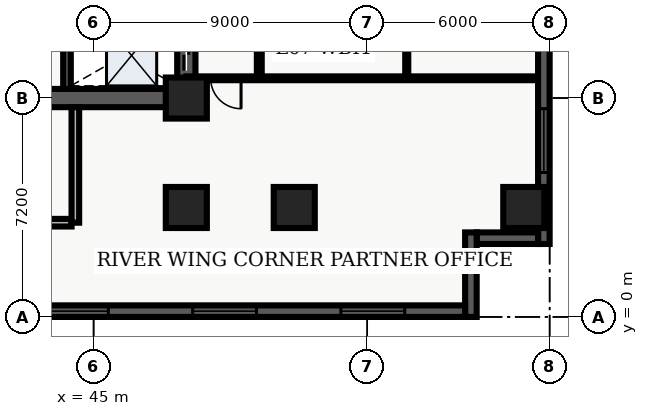
"""IFC4 building model, lengths in metres.
Left out: names, types, materials, properties, quantities, classifications, styles, units other than length and angle.
Written with IfcOpenShell. Run it as: python <this file> out.ifc"""

import sys

from ifc_helpers import new_model, entity, si_unit, converted_unit, direction, frame, origin_with_axes, origin_2d_with_axis, place, context, subcontext, project, spatial, polyline, rectangle, outline, extrude, element, fill, save


model = new_model("IFC4")
c1 = context("Model", 3, precision=1e-05, world=origin_with_axes(), true_north=direction((0.0, 1.0)))
c2 = subcontext(c1, "Body", "Model", "MODEL_VIEW")
j1 = project(units=[si_unit("LENGTHUNIT", "METRE"), converted_unit("PLANEANGLEUNIT", "DEGREE", entity("IfcPlaneAngleMeasure", 0.017), si_unit("PLANEANGLEUNIT", "RADIAN"), dimensions=[0, 0, 0, 0, 0, 0, 0])], contexts=[c1])
p1 = place(None, origin_with_axes())
s1 = spatial("IfcSite", under=j1, at=p1, CompositionType="ELEMENT")
p2 = place(p1, origin_with_axes())
s2 = spatial("IfcBuilding", under=s1, at=p2, CompositionType="ELEMENT")
p3 = place(p2, frame((0.0, 0.0, 32.7), z_axis=(0.0, 0.0, 1.0), x_axis=(1.0, 0.0, 0.0)))
s3 = spatial("IfcBuildingStorey", under=s2, at=p3, CompositionType="ELEMENT", Elevation=32.7)
p4 = place(p3, frame((40.2, 7.2, 0.0), z_axis=(0.0, 0.0, 1.0), x_axis=(1.0, 0.0, 0.0)))
e1 = element("IfcWall", 1, at=p4, inside=s3, PredefinedType="SHEAR", context=c2, shape_type="SweptSolid", body=[
    extrude(outline(polyline([(0.0, -0.3), (7.85, -0.3), (7.85, 0.3), (0.0, 0.3), (0.0, -0.3)])), origin_with_axes(), (0.0, 0.0, 1.0), 3.66),
])
p5 = place(p4, frame((2.175, 0.0, 0.0), z_axis=(0.0, 0.0, 1.0), x_axis=(1.0, 0.0, 0.0)))
e2 = element("IfcOpeningElement", 2, at=p5, cuts=e1, PredefinedType="OPENING", context=c2, shape_type="SweptSolid", body=[
    extrude(rectangle(XDim=1.05, YDim=0.62, at=origin_2d_with_axis()), origin_with_axes(), (0.0, 0.0, 1.0), 2.15),
])
p6 = place(p3, frame((48.05, 7.2, 0.0), z_axis=(0.0, 0.0, 1.0), x_axis=(0.0, 1.0, 0.0)))
e3 = element("IfcWall", 3, at=p6, inside=s3, PredefinedType="SHEAR", context=c2, shape_type="SweptSolid", body=[
    extrude(outline(polyline([(0.0, -0.3), (15.6, -0.3), (15.6, 0.3), (0.0, 0.3), (0.0, -0.3)])), origin_with_axes(), (0.0, 0.0, 1.0), 3.66),
])
p7 = place(p6, frame((1.425, 0.0, 0.0), z_axis=(0.0, 0.0, 1.0), x_axis=(1.0, 0.0, 0.0)))
e4 = element("IfcOpeningElement", 4, at=p7, cuts=e3, PredefinedType="OPENING", context=c2, shape_type="SweptSolid", body=[
    extrude(rectangle(XDim=1.05, YDim=0.62, at=origin_2d_with_axis()), origin_with_axes(), (0.0, 0.0, 1.0), 2.15),
])
p8 = place(p6, frame((3.475, 0.0, 0.0), z_axis=(0.0, 0.0, 1.0), x_axis=(1.0, 0.0, 0.0)))
e5 = element("IfcOpeningElement", 5, at=p8, cuts=e3, PredefinedType="OPENING", context=c2, shape_type="SweptSolid", body=[
    extrude(rectangle(XDim=1.05, YDim=0.62, at=origin_2d_with_axis()), origin_with_axes(), (0.0, 0.0, 1.0), 2.15),
])
p9 = place(p6, frame((5.625, 0.0, 0.0), z_axis=(0.0, 0.0, 1.0), x_axis=(1.0, 0.0, 0.0)))
e6 = element("IfcOpeningElement", 6, at=p9, cuts=e3, PredefinedType="OPENING", context=c2, shape_type="SweptSolid", body=[
    extrude(rectangle(XDim=0.95, YDim=0.62, at=origin_2d_with_axis()), origin_with_axes(), (0.0, 0.0, 1.0), 2.15),
])
p10 = place(p3, frame((44.125, 7.5, 0.0), z_axis=(0.0, 0.0, 1.0), x_axis=(0.0, 1.0, 0.0)))
e7 = element("IfcWall", 7, at=p10, inside=s3, PredefinedType="SHEAR", context=c2, shape_type="SweptSolid", body=[
    extrude(outline(polyline([(0.0, -0.125), (15.0, -0.125), (15.0, 0.125), (0.0, 0.125), (0.0, -0.125)])), origin_with_axes(), (0.0, 0.0, 1.0), 3.66),
])
p11 = place(p3, frame((40.325, 3.1, 0.0), z_axis=(0.0, 0.0, 1.0), x_axis=(1.0, 0.0, 0.0)))
e8 = element("IfcWall", 8, at=p11, inside=s3, PredefinedType="SOLIDWALL", context=c2, shape_type="SweptSolid", body=[
    extrude(outline(polyline([(0.0, -0.125), (3.95, -0.125), (3.95, 0.125), (0.0, 0.125), (0.0, -0.125)])), origin_with_axes(), (0.0, 0.0, 1.0), 2.7),
])
p12 = place(p3, frame((44.4, 3.1, 0.0), z_axis=(0.0, 0.0, 1.0), x_axis=(0.0, 1.0, 0.0)))
e9 = element("IfcWall", 9, at=p12, inside=s3, PredefinedType="SOLIDWALL", context=c2, shape_type="SweptSolid", body=[
    extrude(outline(polyline([(0.0, -0.125), (3.8, -0.125), (3.8, 0.125), (0.0, 0.125), (0.0, -0.125)])), origin_with_axes(), (0.0, 0.0, 1.0), 2.7),
])
for number, where, z_axis, x_axis in (
    (10, (48.05, 3.6, 0.0), (0.0, 0.0, 1.0), (1.0, 0.0, 0.0)),
    (11, (48.05, 7.2, 0.0), (0.0, 0.0, 1.0), (1.0, 0.0, 0.0)),
    (12, (51.6, 3.6, 0.0), (0.0, 0.0, 1.0), (1.0, 0.0, 0.0)),
    (13, (59.15, 3.6, 0.0), (0.0, 0.0, 1.0), (1.0, 0.0, 0.0)),
):
    element("IfcColumn", number, at=place(p3, frame(where, z_axis=z_axis, x_axis=x_axis)), inside=s3, PredefinedType="COLUMN", context=c2, shape_type="SweptSolid", body=[
        extrude(rectangle(XDim=1.35, YDim=1.35, at=origin_2d_with_axis()), origin_with_axes(), (0.0, 0.0, 1.0), 3.9),
    ])
p13 = place(p3, frame((50.45, 7.85, 0.0), z_axis=(0.0, 0.0, 1.0), x_axis=(0.0, 1.0, 0.0)))
e14 = element("IfcWall", 14, at=p13, inside=s3, PredefinedType="PARTITIONING", context=c2, shape_type="SweptSolid", body=[
    extrude(outline(polyline([(0.0, -0.08), (18.8, -0.08), (18.8, 0.08), (0.0, 0.08), (0.0, -0.08)])), origin_with_axes(), (0.0, 0.0, 1.0), 2.7),
])
p14 = place(p13, frame((4.473, 0.0, 0.0), z_axis=(0.0, 0.0, 1.0), x_axis=(1.0, 0.0, 0.0)))
e15 = element("IfcOpeningElement", 15, at=p14, cuts=e14, PredefinedType="OPENING", context=c2, shape_type="SweptSolid", body=[
    extrude(rectangle(XDim=1.0, YDim=0.18, at=origin_2d_with_axis()), origin_with_axes(), (0.0, 0.0, 1.0), 2.15),
])
p15 = place(p13, frame((7.597, 0.0, 0.0), z_axis=(0.0, 0.0, 1.0), x_axis=(1.0, 0.0, 0.0)))
e16 = element("IfcOpeningElement", 16, at=p15, cuts=e14, PredefinedType="OPENING", context=c2, shape_type="SweptSolid", body=[
    extrude(rectangle(XDim=1.0, YDim=0.18, at=origin_2d_with_axis()), origin_with_axes(), (0.0, 0.0, 1.0), 2.15),
])
p16 = place(p13, frame((14.075, 0.0, 0.0), z_axis=(0.0, 0.0, 1.0), x_axis=(1.0, 0.0, 0.0)))
e17 = element("IfcOpeningElement", 17, at=p16, cuts=e14, PredefinedType="OPENING", context=c2, shape_type="SweptSolid", body=[
    extrude(rectangle(XDim=1.0, YDim=0.18, at=origin_2d_with_axis()), origin_with_axes(), (0.0, 0.0, 1.0), 2.15),
])
p17 = place(p3, frame((59.64, 7.85, 0.0), z_axis=(0.0, 0.0, 1.0), x_axis=(-1.0, 0.0, 0.0)))
e18 = element("IfcWall", 18, at=p17, inside=s3, PredefinedType="PARTITIONING", context=c2, shape_type="SweptSolid", body=[
    extrude(outline(polyline([(0.0, -0.062), (11.59, -0.062), (11.59, 0.062), (0.0, 0.062), (0.0, -0.062)])), origin_with_axes(), (0.0, 0.0, 1.0), 2.7),
])
p18 = place(p17, frame((10.29, 0.0, 0.0), z_axis=(0.0, 0.0, 1.0), x_axis=(1.0, 0.0, 0.0)))
e19 = element("IfcOpeningElement", 19, at=p18, cuts=e18, PredefinedType="OPENING", context=c2, shape_type="SweptSolid", body=[
    extrude(rectangle(XDim=1.0, YDim=0.145, at=origin_2d_with_axis()), origin_with_axes(), (0.0, 0.0, 1.0), 2.15),
])
p19 = place(p3, frame((55.3, 7.98, 0.0), z_axis=(0.0, 0.0, 1.0), x_axis=(0.0, 1.0, 0.0)))
e20 = element("IfcWall", 20, at=p19, inside=s3, PredefinedType="PARTITIONING", context=c2, shape_type="SweptSolid", body=[
    extrude(outline(polyline([(0.0, -0.05), (18.54, -0.05), (18.54, 0.05), (0.0, 0.05), (0.0, -0.05)])), origin_with_axes(), (0.0, 0.0, 1.0), 2.7),
])
p20 = place(p19, frame((2.471, 0.0, 0.0), z_axis=(0.0, 0.0, 1.0), x_axis=(1.0, 0.0, 0.0)))
e21 = element("IfcOpeningElement", 21, at=p20, cuts=e20, PredefinedType="OPENING", context=c2, shape_type="SweptSolid", body=[
    extrude(rectangle(XDim=0.95, YDim=0.12, at=origin_2d_with_axis()), origin_with_axes(), (0.0, 0.0, 1.0), 2.15),
])
p21 = place(p19, frame((8.027, 0.0, 0.0), z_axis=(0.0, 0.0, 1.0), x_axis=(1.0, 0.0, 0.0)))
e22 = element("IfcOpeningElement", 22, at=p21, cuts=e20, PredefinedType="OPENING", context=c2, shape_type="SweptSolid", body=[
    extrude(rectangle(XDim=0.95, YDim=0.12, at=origin_2d_with_axis()), origin_with_axes(), (0.0, 0.0, 1.0), 2.15),
])
p22 = place(p19, frame((14.825, 0.0, 0.0), z_axis=(0.0, 0.0, 1.0), x_axis=(1.0, 0.0, 0.0)))
e23 = element("IfcOpeningElement", 23, at=p22, cuts=e20, PredefinedType="OPENING", context=c2, shape_type="SweptSolid", body=[
    extrude(rectangle(XDim=0.95, YDim=0.12, at=origin_2d_with_axis()), origin_with_axes(), (0.0, 0.0, 1.0), 2.15),
])
p23 = place(p3, frame((59.81, 26.02, 0.0), z_axis=(0.0, 0.0, 1.0), x_axis=(0.0, -1.0, 0.0)))
e24 = element("IfcWall", 24, at=p23, inside=s3, PredefinedType="SOLIDWALL", context=c2, shape_type="SweptSolid", body=[
    extrude(outline(polyline([(0.0, -0.19), (23.62, -0.19), (23.62, 0.19), (0.0, 0.19), (0.0, -0.19)])), origin_with_axes(), (0.0, 0.0, 1.0), 3.66),
])
p24 = place(p23, frame((3.853, 0.0, 0.45), z_axis=(0.0, 0.0, 1.0), x_axis=(1.0, 0.0, 0.0)))
e25 = element("IfcOpeningElement", 25, at=p24, cuts=e24, PredefinedType="OPENING", context=c2, shape_type="SweptSolid", body=[
    extrude(rectangle(XDim=2.1, YDim=0.4, at=origin_2d_with_axis()), origin_with_axes(), (0.0, 0.0, 1.0), 2.2),
])
p25 = place(p23, frame((20.218, 0.0, 0.45), z_axis=(0.0, 0.0, 1.0), x_axis=(1.0, 0.0, 0.0)))
e26 = element("IfcOpeningElement", 26, at=p25, cuts=e24, PredefinedType="OPENING", context=c2, shape_type="SweptSolid", body=[
    extrude(rectangle(XDim=2.1, YDim=0.4, at=origin_2d_with_axis()), origin_with_axes(), (0.0, 0.0, 1.0), 2.2),
])
p26 = place(p3, frame((59.62, 2.59, 0.0), z_axis=(0.0, 0.0, 1.0), x_axis=(-1.0, 0.0, 0.0)))
e27 = element("IfcWall", 27, at=p26, inside=s3, PredefinedType="SOLIDWALL", context=c2, shape_type="SweptSolid", body=[
    extrude(outline(polyline([(0.0, -0.19), (2.02, -0.19), (2.02, 0.19), (0.0, 0.19), (0.0, -0.19)])), origin_with_axes(), (0.0, 0.0, 1.0), 3.66),
])
p27 = place(p3, frame((57.41, 2.78, 0.0), z_axis=(0.0, 0.0, 1.0), x_axis=(0.0, -1.0, 0.0)))
e28 = element("IfcWall", 28, at=p27, inside=s3, PredefinedType="SOLIDWALL", context=c2, shape_type="SweptSolid", body=[
    extrude(outline(polyline([(0.0, -0.19), (2.78, -0.19), (2.78, 0.19), (0.0, 0.19), (0.0, -0.19)])), origin_with_axes(), (0.0, 0.0, 1.0), 3.66),
])
p28 = place(p3, frame((57.22, 0.19, 0.0), z_axis=(0.0, 0.0, 1.0), x_axis=(-1.0, 0.0, 0.0)))
e29 = element("IfcWall", 29, at=p28, inside=s3, PredefinedType="SOLIDWALL", context=c2, shape_type="SweptSolid", body=[
    extrude(outline(polyline([(0.0, -0.19), (54.82, -0.19), (54.82, 0.19), (0.0, 0.19), (0.0, -0.19)])), origin_with_axes(), (0.0, 0.0, 1.0), 3.66),
])
p29 = place(p28, frame((3.037, 0.0, 0.45), z_axis=(0.0, 0.0, 1.0), x_axis=(1.0, 0.0, 0.0)))
e30 = element("IfcOpeningElement", 30, at=p29, cuts=e29, PredefinedType="OPENING", context=c2, shape_type="SweptSolid", body=[
    extrude(rectangle(XDim=2.1, YDim=0.4, at=origin_2d_with_axis()), origin_with_axes(), (0.0, 0.0, 1.0), 2.2),
])
p30 = place(p28, frame((7.912, 0.0, 0.45), z_axis=(0.0, 0.0, 1.0), x_axis=(1.0, 0.0, 0.0)))
e31 = element("IfcOpeningElement", 31, at=p30, cuts=e29, PredefinedType="OPENING", context=c2, shape_type="SweptSolid", body=[
    extrude(rectangle(XDim=2.1, YDim=0.4, at=origin_2d_with_axis()), origin_with_axes(), (0.0, 0.0, 1.0), 2.2),
])
p31 = place(p28, frame((12.786, 0.0, 0.45), z_axis=(0.0, 0.0, 1.0), x_axis=(1.0, 0.0, 0.0)))
e32 = element("IfcOpeningElement", 32, at=p31, cuts=e29, PredefinedType="OPENING", context=c2, shape_type="SweptSolid", body=[
    extrude(rectangle(XDim=2.1, YDim=0.4, at=origin_2d_with_axis()), origin_with_axes(), (0.0, 0.0, 1.0), 2.2),
])
p32 = place(p28, frame((17.661, 0.0, 0.45), z_axis=(0.0, 0.0, 1.0), x_axis=(1.0, 0.0, 0.0)))
e33 = element("IfcOpeningElement", 33, at=p32, cuts=e29, PredefinedType="OPENING", context=c2, shape_type="SweptSolid", body=[
    extrude(rectangle(XDim=2.1, YDim=0.4, at=origin_2d_with_axis()), origin_with_axes(), (0.0, 0.0, 1.0), 2.2),
])
p33 = place(p28, frame((22.535, 0.0, 0.45), z_axis=(0.0, 0.0, 1.0), x_axis=(1.0, 0.0, 0.0)))
e34 = element("IfcOpeningElement", 34, at=p33, cuts=e29, PredefinedType="OPENING", context=c2, shape_type="SweptSolid", body=[
    extrude(rectangle(XDim=2.1, YDim=0.4, at=origin_2d_with_axis()), origin_with_axes(), (0.0, 0.0, 1.0), 2.2),
])
p34 = place(p28, frame((27.41, 0.0, 0.45), z_axis=(0.0, 0.0, 1.0), x_axis=(1.0, 0.0, 0.0)))
e35 = element("IfcOpeningElement", 35, at=p34, cuts=e29, PredefinedType="OPENING", context=c2, shape_type="SweptSolid", body=[
    extrude(rectangle(XDim=2.1, YDim=0.4, at=origin_2d_with_axis()), origin_with_axes(), (0.0, 0.0, 1.0), 2.2),
])
p35 = place(p28, frame((32.285, 0.0, 0.45), z_axis=(0.0, 0.0, 1.0), x_axis=(1.0, 0.0, 0.0)))
e36 = element("IfcOpeningElement", 36, at=p35, cuts=e29, PredefinedType="OPENING", context=c2, shape_type="SweptSolid", body=[
    extrude(rectangle(XDim=2.1, YDim=0.4, at=origin_2d_with_axis()), origin_with_axes(), (0.0, 0.0, 1.0), 2.2),
])
p36 = place(p28, frame((37.159, 0.0, 0.45), z_axis=(0.0, 0.0, 1.0), x_axis=(1.0, 0.0, 0.0)))
e37 = element("IfcOpeningElement", 37, at=p36, cuts=e29, PredefinedType="OPENING", context=c2, shape_type="SweptSolid", body=[
    extrude(rectangle(XDim=2.1, YDim=0.4, at=origin_2d_with_axis()), origin_with_axes(), (0.0, 0.0, 1.0), 2.2),
])
p37 = place(p28, frame((42.034, 0.0, 0.45), z_axis=(0.0, 0.0, 1.0), x_axis=(1.0, 0.0, 0.0)))
e38 = element("IfcOpeningElement", 38, at=p37, cuts=e29, PredefinedType="OPENING", context=c2, shape_type="SweptSolid", body=[
    extrude(rectangle(XDim=2.1, YDim=0.4, at=origin_2d_with_axis()), origin_with_axes(), (0.0, 0.0, 1.0), 2.2),
])
p38 = place(p28, frame((51.783, 0.0, 0.45), z_axis=(0.0, 0.0, 1.0), x_axis=(1.0, 0.0, 0.0)))
e39 = element("IfcOpeningElement", 39, at=p38, cuts=e29, PredefinedType="OPENING", context=c2, shape_type="SweptSolid", body=[
    extrude(rectangle(XDim=2.1, YDim=0.4, at=origin_2d_with_axis()), origin_with_axes(), (0.0, 0.0, 1.0), 2.2),
])
p39 = place(p6, frame((1.425, 0.0, 0.0), z_axis=(0.0, 0.0, 1.0), x_axis=(1.0, 0.0, 0.0)))
e40 = element("IfcDoor", 40, at=p39, inside=s3, OperationType="SLIDING_TO_LEFT", PredefinedType="DOOR", context=c2, shape_type="SweptSolid", body=[
    extrude(rectangle(XDim=1.05, YDim=0.09, at=origin_2d_with_axis()), origin_with_axes(), (0.0, 0.0, 1.0), 2.15),
])
fill(e4, e40)
p40 = place(p17, frame((10.29, 0.0, 0.0), z_axis=(0.0, 0.0, 1.0), x_axis=(1.0, 0.0, 0.0)))
e41 = element("IfcDoor", 41, at=p40, inside=s3, OperationType="SINGLE_SWING_LEFT", PredefinedType="DOOR", context=c2, shape_type="SweptSolid", body=[
    extrude(rectangle(XDim=1.0, YDim=0.075, at=origin_2d_with_axis()), origin_with_axes(), (0.0, 0.0, 1.0), 2.15),
])
fill(e19, e41)
p41 = place(p23, frame((20.218, 0.0, 0.45), z_axis=(0.0, 0.0, 1.0), x_axis=(1.0, 0.0, 0.0)))
e42 = element("IfcWindow", 42, at=p41, inside=s3, PredefinedType="WINDOW", context=c2, shape_type="SweptSolid", body=[
    extrude(rectangle(XDim=2.1, YDim=0.09, at=origin_2d_with_axis()), origin_with_axes(), (0.0, 0.0, 1.0), 2.2),
])
fill(e26, e42)
p42 = place(p28, frame((3.037, 0.0, 0.45), z_axis=(0.0, 0.0, 1.0), x_axis=(1.0, 0.0, 0.0)))
e43 = element("IfcWindow", 43, at=p42, inside=s3, PredefinedType="WINDOW", context=c2, shape_type="SweptSolid", body=[
    extrude(rectangle(XDim=2.1, YDim=0.09, at=origin_2d_with_axis()), origin_with_axes(), (0.0, 0.0, 1.0), 2.2),
])
fill(e30, e43)
p43 = place(p28, frame((7.912, 0.0, 0.45), z_axis=(0.0, 0.0, 1.0), x_axis=(1.0, 0.0, 0.0)))
e44 = element("IfcWindow", 44, at=p43, inside=s3, PredefinedType="WINDOW", context=c2, shape_type="SweptSolid", body=[
    extrude(rectangle(XDim=2.1, YDim=0.09, at=origin_2d_with_axis()), origin_with_axes(), (0.0, 0.0, 1.0), 2.2),
])
fill(e31, e44)
p44 = place(p28, frame((12.786, 0.0, 0.45), z_axis=(0.0, 0.0, 1.0), x_axis=(1.0, 0.0, 0.0)))
e45 = element("IfcWindow", 45, at=p44, inside=s3, PredefinedType="WINDOW", context=c2, shape_type="SweptSolid", body=[
    extrude(rectangle(XDim=2.1, YDim=0.09, at=origin_2d_with_axis()), origin_with_axes(), (0.0, 0.0, 1.0), 2.2),
])
fill(e32, e45)
save(model, sys.argv[1])
